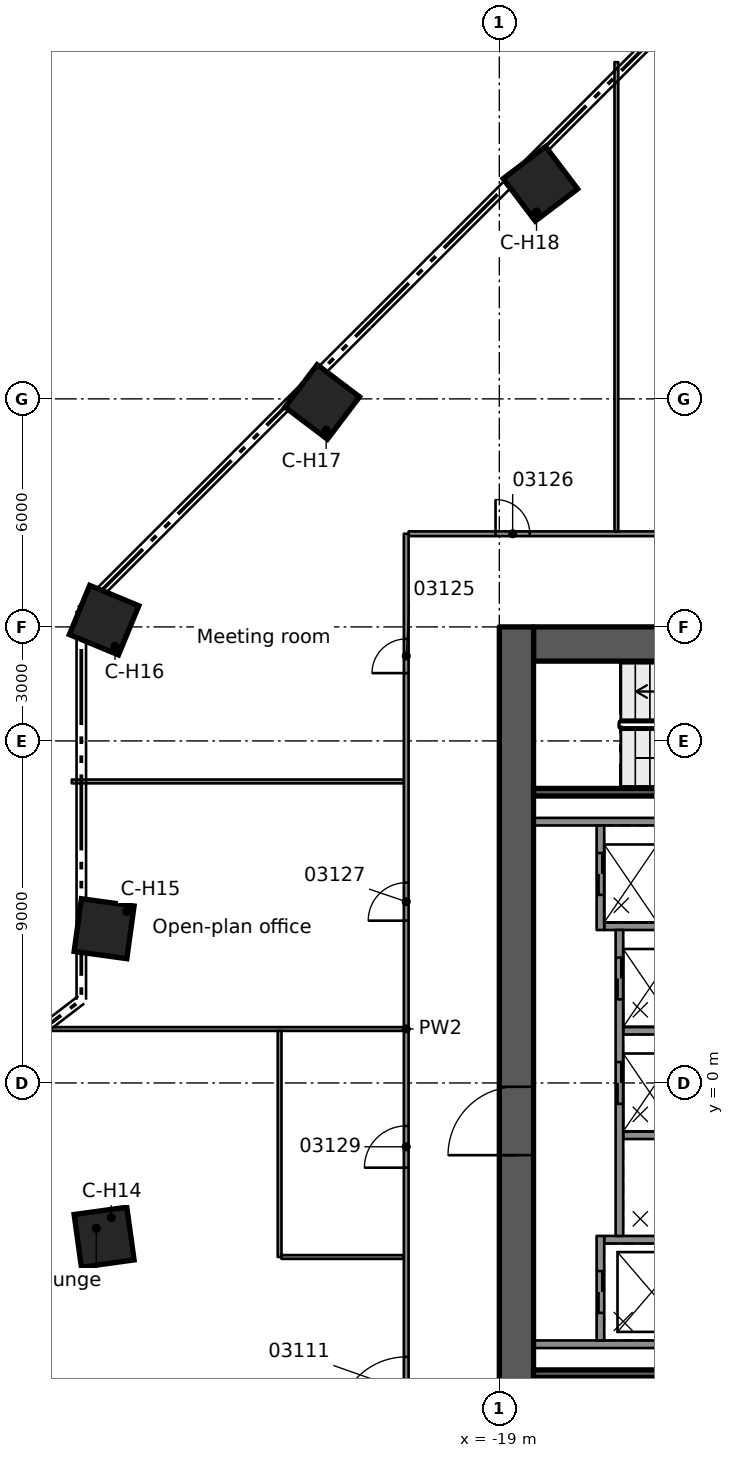
"""IFC4 building model, lengths in metres.
Left out: names, types, materials, properties, quantities, classifications, styles, units other than length and angle.
Written with IfcOpenShell. Run it as: python <this file> out.ifc"""

import sys

from ifc_helpers import new_model, si_unit, direction, frame, frame_2d, origin, origin_2d, place, context, subcontext, project, spatial, rectangle, extrude, element, fill, save


model = new_model("IFC4")
c1 = context("Model", 3, precision=1e-05, world=origin(), true_north=direction((0.0, 1.0)))
c2 = subcontext(c1, "Body", "Model", "MODEL_VIEW")
j1 = project(units=[si_unit("LENGTHUNIT", "METRE"), si_unit("PLANEANGLEUNIT", "RADIAN")], contexts=[c1])
p1 = place(None, origin())
s1 = spatial("IfcSite", under=j1, at=p1, CompositionType="ELEMENT")
p2 = place(p1, origin())
s2 = spatial("IfcBuilding", under=s1, at=p2, CompositionType="ELEMENT")
p3 = place(p2, frame((0.0, 0.0, 15.5)))
s3 = spatial("IfcBuildingStorey", under=s2, at=p3, CompositionType="ELEMENT", Elevation=15.5)
p4 = place(p3, frame((-18.1, 11.55, 0.0), z_axis=(0.0, 0.0, 1.0), x_axis=(1.0, 0.0, 0.0)))
e1 = element("IfcWall", 1, at=p4, inside=s3, PredefinedType="SHEAR", context=c2, shape_type="SweptSolid", body=[
    extrude(rectangle(XDim=9.2, YDim=0.9, at=frame_2d((4.6, 0.0))), origin(), (0.0, 0.0, 1.0), 5.0),
])
p5 = place(p4, frame((5.1, 0.0, 0.0)))
e2 = element("IfcOpeningElement", 2, at=p5, cuts=e1, PredefinedType="OPENING", context=c2, shape_type="SweptSolid", body=[
    extrude(rectangle(XDim=1.1, YDim=2.1, at=frame_2d((0.55, 1.05))), frame((0.0, 0.46, 0.0), z_axis=(0.0, -1.0, 0.0), x_axis=(1.0, 0.0, 0.0)), (0.0, 0.0, 1.0), 0.92),
])
p6 = place(p3, frame((-18.55, -12.0, 0.0), z_axis=(0.0, 0.0, 1.0), x_axis=(0.0, 1.0, 0.0)))
e3 = element("IfcWall", 3, at=p6, inside=s3, PredefinedType="SHEAR", context=c2, shape_type="SweptSolid", body=[
    extrude(rectangle(XDim=24.0, YDim=0.9, at=frame_2d((12.0, 0.0))), origin(), (0.0, 0.0, 1.0), 5.0),
])
p7 = place(p6, frame((10.1, 0.0, 0.0)))
e4 = element("IfcOpeningElement", 4, at=p7, cuts=e3, PredefinedType="OPENING", context=c2, shape_type="SweptSolid", body=[
    extrude(rectangle(XDim=1.8, YDim=2.1, at=frame_2d((0.9, 1.05))), frame((0.0, 0.46, 0.0), z_axis=(0.0, -1.0, 0.0), x_axis=(1.0, 0.0, 0.0)), (0.0, 0.0, 1.0), 0.92),
])
for number, where, z_axis, x_axis in (
    (5, (-29.4, -4.059, 0.0), (0.0, 0.0, 1.0), (-0.991, -0.137, 0.0)),
    (6, (-29.4, 4.059, 0.0), (0.0, 0.0, 1.0), (-0.991, 0.137, 0.0)),
    (7, (-29.4, 12.178, 0.0), (0.0, 0.0, 1.0), (-0.924, 0.383, 0.0)),
    (8, (-23.659, 17.919, 0.0), (0.0, 0.0, 1.0), (-0.797, 0.604, 0.0)),
    (9, (-17.919, 23.659, 0.0), (0.0, 0.0, 1.0), (-0.604, 0.797, 0.0)),
):
    element("IfcColumn", number, at=place(p3, frame(where, z_axis=z_axis, x_axis=x_axis)), inside=s3, PredefinedType="COLUMN", context=c2, shape_type="SweptSolid", body=[
        extrude(rectangle(XDim=1.4, YDim=1.4, at=origin_2d()), origin(), (0.0, 0.0, 1.0), 5.0),
    ])
for number, where, z_axis, x_axis in (
    (10, (-11.54, 6.875, 0.0), (0.0, 0.0, 1.0), (-1.0, 0.0, 0.0)),
    (11, (-11.54, -6.875, 0.0), (0.0, 0.0, 1.0), (-1.0, 0.0, 0.0)),
):
    element("IfcWall", number, at=place(p3, frame(where, z_axis=z_axis, x_axis=x_axis)), inside=s3, PredefinedType="SOLIDWALL", context=c2, shape_type="SweptSolid", body=[
        extrude(rectangle(XDim=6.56, YDim=0.2, at=frame_2d((3.28, 0.0))), origin(), (0.0, 0.0, 1.0), 4.59),
    ])
p8 = place(p3, frame((-11.54, -4.125, 0.0), z_axis=(0.0, 0.0, 1.0), x_axis=(-1.0, 0.0, 0.0)))
e12 = element("IfcWall", 12, at=p8, inside=s3, PredefinedType="SOLIDWALL", context=c2, shape_type="SweptSolid", body=[
    extrude(rectangle(XDim=4.7, YDim=0.2, at=frame_2d((2.35, 0.0))), origin(), (0.0, 0.0, 1.0), 4.59),
])
for number, where, z_axis, x_axis in (
    (13, (-11.54, -1.375, 0.0), (0.0, 0.0, 1.0), (-1.0, 0.0, 0.0)),
    (14, (-11.54, 1.375, 0.0), (0.0, 0.0, 1.0), (-1.0, 0.0, 0.0)),
):
    element("IfcWall", number, at=place(p3, frame(where, z_axis=z_axis, x_axis=x_axis)), inside=s3, PredefinedType="SOLIDWALL", context=c2, shape_type="SweptSolid", body=[
        extrude(rectangle(XDim=4.2, YDim=0.2, at=frame_2d((2.1, 0.0))), origin(), (0.0, 0.0, 1.0), 4.59),
    ])
p9 = place(p3, frame((-11.54, 4.125, 0.0), z_axis=(0.0, 0.0, 1.0), x_axis=(-1.0, 0.0, 0.0)))
e15 = element("IfcWall", 15, at=p9, inside=s3, PredefinedType="SOLIDWALL", context=c2, shape_type="SweptSolid", body=[
    extrude(rectangle(XDim=4.7, YDim=0.2, at=frame_2d((2.35, 0.0))), origin(), (0.0, 0.0, 1.0), 4.59),
])
p10 = place(p3, frame((-16.34, -6.775, 0.0), z_axis=(0.0, 0.0, 1.0), x_axis=(0.0, 1.0, 0.0)))
e16 = element("IfcWall", 16, at=p10, inside=s3, PredefinedType="SOLIDWALL", context=c2, shape_type="SweptSolid", body=[
    extrude(rectangle(XDim=2.75, YDim=0.2, at=frame_2d((1.375, 0.0))), origin(), (0.0, 0.0, 1.0), 4.59),
])
p11 = place(p10, frame((0.725, 0.0, 0.0)))
e17 = element("IfcOpeningElement", 17, at=p11, cuts=e16, PredefinedType="OPENING", context=c2, shape_type="SweptSolid", body=[
    extrude(rectangle(XDim=1.1, YDim=2.1, at=frame_2d((0.55, 1.05))), frame((0.0, 0.11, 0.0), z_axis=(0.0, -1.0, 0.0), x_axis=(1.0, 0.0, 0.0)), (0.0, 0.0, 1.0), 0.22),
])
p12 = place(p3, frame((-15.84, -4.025, 0.0), z_axis=(0.0, 0.0, 1.0), x_axis=(0.0, 1.0, 0.0)))
e18 = element("IfcWall", 18, at=p12, inside=s3, PredefinedType="SOLIDWALL", context=c2, shape_type="SweptSolid", body=[
    extrude(rectangle(XDim=8.05, YDim=0.2, at=frame_2d((4.025, 0.0))), origin(), (0.0, 0.0, 1.0), 4.59),
])
p13 = place(p12, frame((3.475, 0.0, 0.0)))
e19 = element("IfcOpeningElement", 19, at=p13, cuts=e18, PredefinedType="OPENING", context=c2, shape_type="SweptSolid", body=[
    extrude(rectangle(XDim=1.1, YDim=2.1, at=frame_2d((0.55, 1.05))), frame((0.0, 0.11, 0.0), z_axis=(0.0, -1.0, 0.0), x_axis=(1.0, 0.0, 0.0)), (0.0, 0.0, 1.0), 0.22),
])
p14 = place(p12, frame((6.225, 0.0, 0.0)))
e20 = element("IfcOpeningElement", 20, at=p14, cuts=e18, PredefinedType="OPENING", context=c2, shape_type="SweptSolid", body=[
    extrude(rectangle(XDim=1.1, YDim=2.1, at=frame_2d((0.55, 1.05))), frame((0.0, 0.11, 0.0), z_axis=(0.0, -1.0, 0.0), x_axis=(1.0, 0.0, 0.0)), (0.0, 0.0, 1.0), 0.22),
])
p15 = place(p3, frame((-16.34, 4.025, 0.0), z_axis=(0.0, 0.0, 1.0), x_axis=(0.0, 1.0, 0.0)))
e21 = element("IfcWall", 21, at=p15, inside=s3, PredefinedType="SOLIDWALL", context=c2, shape_type="SweptSolid", body=[
    extrude(rectangle(XDim=2.75, YDim=0.2, at=frame_2d((1.375, 0.0))), origin(), (0.0, 0.0, 1.0), 4.59),
])
p16 = place(p15, frame((0.925, 0.0, 0.0)))
e22 = element("IfcOpeningElement", 22, at=p16, cuts=e21, PredefinedType="OPENING", context=c2, shape_type="SweptSolid", body=[
    extrude(rectangle(XDim=1.1, YDim=2.1, at=frame_2d((0.55, 1.05))), frame((0.0, 0.11, 0.0), z_axis=(0.0, -1.0, 0.0), x_axis=(1.0, 0.0, 0.0)), (0.0, 0.0, 1.0), 0.22),
])
for number, where, z_axis, x_axis in (
    (23, (-11.54, 7.65, 0.0), (0.0, 0.0, 1.0), (-1.0, 0.0, 0.0)),
    (24, (-11.54, -7.65, 0.0), (0.0, 0.0, 1.0), (-1.0, 0.0, 0.0)),
):
    element("IfcWall", number, at=place(p3, frame(where, z_axis=z_axis, x_axis=x_axis)), inside=s3, PredefinedType="SOLIDWALL", context=c2, shape_type="SweptSolid", body=[
        extrude(rectangle(XDim=6.56, YDim=0.2, at=frame_2d((3.28, 0.0))), origin(), (0.0, 0.0, 1.0), 4.59),
    ])
p17 = place(p3, frame((-36.678, -2.62, 0.0), z_axis=(0.0, 0.0, 1.0), x_axis=(0.608783902678, -0.793336095132, 0.0)))
e25 = element("IfcWall", 25, at=p17, inside=s3, PredefinedType="PARTITIONING", context=c2, shape_type="SweptSolid", body=[
    extrude(rectangle(XDim=14.136, YDim=0.1, at=frame_2d((7.068, 0.0))), origin(), (0.0, 0.0, 1.0), 4.58),
])
p18 = place(p3, frame((-24.732, -4.579, 0.0), z_axis=(0.0, 0.0, 1.0), x_axis=(1.0, 0.0, 0.0)))
e26 = element("IfcWall", 26, at=p18, inside=s3, PredefinedType="PARTITIONING", context=c2, shape_type="SweptSolid", body=[
    extrude(rectangle(XDim=3.22, YDim=0.1, at=frame_2d((1.61, 0.0))), origin(), (0.0, 0.0, 1.0), 4.58),
])
p19 = place(p3, frame((-31.414, 1.42, 0.0), z_axis=(0.0, 0.0, 1.0), x_axis=(1.0, 0.0, 0.0)))
e27 = element("IfcWall", 27, at=p19, inside=s3, PredefinedType="PARTITIONING", context=c2, shape_type="SweptSolid", body=[
    extrude(rectangle(XDim=9.902, YDim=0.1, at=frame_2d((4.951, 0.0))), origin(), (0.0, 0.0, 1.0), 4.58),
])
p20 = place(p3, frame((-30.25, 7.934, 0.0), z_axis=(0.0, 0.0, 1.0), x_axis=(1.0, 0.0, 0.0)))
e28 = element("IfcWall", 28, at=p20, inside=s3, PredefinedType="PARTITIONING", context=c2, shape_type="SweptSolid", body=[
    extrude(rectangle(XDim=8.738, YDim=0.1, at=frame_2d((4.369, 0.0))), origin(), (0.0, 0.0, 1.0), 4.58),
])
p21 = place(p3, frame((-21.387, 14.451, 0.0), z_axis=(0.0, 0.0, 1.0), x_axis=(1.0, 0.0, 0.0)))
e29 = element("IfcWall", 29, at=p21, inside=s3, PredefinedType="PARTITIONING", context=c2, shape_type="SweptSolid", body=[
    extrude(rectangle(XDim=10.996, YDim=0.125, at=frame_2d((5.498, 0.0))), origin(), (0.0, 0.0, 1.0), 4.58),
])
p22 = place(p21, frame((2.288, 0.0, 0.0)))
e30 = element("IfcOpeningElement", 30, at=p22, cuts=e29, PredefinedType="OPENING", context=c2, shape_type="SweptSolid", body=[
    extrude(rectangle(XDim=0.9, YDim=2.1, at=frame_2d((0.45, 1.05))), frame((0.0, 0.073, 0.0), z_axis=(0.0, -1.0, 0.0), x_axis=(1.0, 0.0, 0.0)), (0.0, 0.0, 1.0), 0.145),
])
p23 = place(p3, frame((-15.92, 14.514, 0.0), z_axis=(0.0, 0.0, 1.0), x_axis=(0.0, 1.0, 0.0)))
e31 = element("IfcWall", 31, at=p23, inside=s3, PredefinedType="PARTITIONING", context=c2, shape_type="SweptSolid", body=[
    extrude(rectangle(XDim=12.346, YDim=0.1, at=frame_2d((6.173, 0.0))), origin(), (0.0, 0.0, 1.0), 4.58),
])
p24 = place(p3, frame((-21.45, -11.607, 0.0), z_axis=(0.0, 0.0, 1.0), x_axis=(0.0, 1.0, 0.0)))
e32 = element("IfcWall", 32, at=p24, inside=s3, PredefinedType="PARTITIONING", context=c2, shape_type="SweptSolid", body=[
    extrude(rectangle(XDim=26.058, YDim=0.125, at=frame_2d((13.029, 0.0))), origin(), (0.0, 0.0, 1.0), 4.58),
])
p25 = place(p24, frame((2.6, 0.0, 0.0)))
e33 = element("IfcOpeningElement", 33, at=p25, cuts=e32, PredefinedType="OPENING", context=c2, shape_type="SweptSolid", body=[
    extrude(rectangle(XDim=1.8, YDim=2.1, at=frame_2d((0.9, 1.05))), frame((0.0, 0.073, 0.0), z_axis=(0.0, -1.0, 0.0), x_axis=(1.0, 0.0, 0.0)), (0.0, 0.0, 1.0), 0.145),
])
p26 = place(p24, frame((22.391, 0.0, 0.0)))
e34 = element("IfcOpeningElement", 34, at=p26, cuts=e32, PredefinedType="OPENING", context=c2, shape_type="SweptSolid", body=[
    extrude(rectangle(XDim=0.9, YDim=2.1, at=frame_2d((0.45, 1.05))), frame((0.0, 0.073, 0.0), z_axis=(0.0, -1.0, 0.0), x_axis=(1.0, 0.0, 0.0)), (0.0, 0.0, 1.0), 0.145),
])
p27 = place(p24, frame((15.877, 0.0, 0.0)))
e35 = element("IfcOpeningElement", 35, at=p27, cuts=e32, PredefinedType="OPENING", context=c2, shape_type="SweptSolid", body=[
    extrude(rectangle(XDim=1.0, YDim=2.1, at=frame_2d((0.5, 1.05))), frame((0.0, 0.073, 0.0), z_axis=(0.0, -1.0, 0.0), x_axis=(1.0, 0.0, 0.0)), (0.0, 0.0, 1.0), 0.145),
])
p28 = place(p24, frame((9.378, 0.0, 0.0)))
e36 = element("IfcOpeningElement", 36, at=p28, cuts=e32, PredefinedType="OPENING", context=c2, shape_type="SweptSolid", body=[
    extrude(rectangle(XDim=1.1, YDim=2.1, at=frame_2d((0.55, 1.05))), frame((0.0, 0.073, 0.0), z_axis=(0.0, -1.0, 0.0), x_axis=(1.0, 0.0, 0.0)), (0.0, 0.0, 1.0), 0.145),
])
p29 = place(p3, frame((-24.782, -4.579, 0.0), z_axis=(0.0, 0.0, 1.0), x_axis=(0.0, 1.0, 0.0)))
e37 = element("IfcWall", 37, at=p29, inside=s3, PredefinedType="PARTITIONING", context=c2, shape_type="SweptSolid", body=[
    extrude(rectangle(XDim=5.949, YDim=0.1, at=frame_2d((2.975, 0.0))), origin(), (0.0, 0.0, 1.0), 4.58),
])
p30 = place(p11, origin())
e38 = element("IfcDoor", 38, at=p30, inside=s3, OperationType="DOUBLE_DOOR_SLIDING", PredefinedType="DOOR", context=c2, shape_type="SweptSolid", body=[
    extrude(rectangle(XDim=1.1, YDim=2.1, at=frame_2d((0.55, 1.05))), frame((0.0, 0.025, 0.0), z_axis=(0.0, -1.0, 0.0), x_axis=(1.0, 0.0, 0.0)), (0.0, 0.0, 1.0), 0.05),
])
fill(e17, e38)
p31 = place(p13, origin())
e39 = element("IfcDoor", 39, at=p31, inside=s3, OperationType="DOUBLE_DOOR_SLIDING", PredefinedType="DOOR", context=c2, shape_type="SweptSolid", body=[
    extrude(rectangle(XDim=1.1, YDim=2.1, at=frame_2d((0.55, 1.05))), frame((0.0, 0.025, 0.0), z_axis=(0.0, -1.0, 0.0), x_axis=(1.0, 0.0, 0.0)), (0.0, 0.0, 1.0), 0.05),
])
fill(e19, e39)
p32 = place(p14, origin())
e40 = element("IfcDoor", 40, at=p32, inside=s3, OperationType="DOUBLE_DOOR_SLIDING", PredefinedType="DOOR", context=c2, shape_type="SweptSolid", body=[
    extrude(rectangle(XDim=1.1, YDim=2.1, at=frame_2d((0.55, 1.05))), frame((0.0, 0.025, 0.0), z_axis=(0.0, -1.0, 0.0), x_axis=(1.0, 0.0, 0.0)), (0.0, 0.0, 1.0), 0.05),
])
fill(e20, e40)
p33 = place(p16, origin())
e41 = element("IfcDoor", 41, at=p33, inside=s3, OperationType="DOUBLE_DOOR_SLIDING", PredefinedType="DOOR", context=c2, shape_type="SweptSolid", body=[
    extrude(rectangle(XDim=1.1, YDim=2.1, at=frame_2d((0.55, 1.05))), frame((0.0, 0.025, 0.0), z_axis=(0.0, -1.0, 0.0), x_axis=(1.0, 0.0, 0.0)), (0.0, 0.0, 1.0), 0.05),
])
fill(e22, e41)
p34 = place(p7, origin())
e42 = element("IfcDoor", 42, at=p34, inside=s3, OperationType="SINGLE_SWING_LEFT", PredefinedType="DOOR", context=c2, shape_type="SweptSolid", body=[
    extrude(rectangle(XDim=1.8, YDim=2.1, at=frame_2d((0.9, 1.05))), frame((0.0, 0.025, 0.0), z_axis=(0.0, -1.0, 0.0), x_axis=(1.0, 0.0, 0.0)), (0.0, 0.0, 1.0), 0.05),
])
fill(e4, e42)
p35 = place(p25, origin())
e43 = element("IfcDoor", 43, at=p35, inside=s3, OperationType="DOUBLE_DOOR_SINGLE_SWING", PredefinedType="DOOR", context=c2, shape_type="SweptSolid", body=[
    extrude(rectangle(XDim=1.8, YDim=2.1, at=frame_2d((0.9, 1.05))), frame((0.0, 0.025, 0.0), z_axis=(0.0, -1.0, 0.0), x_axis=(1.0, 0.0, 0.0)), (0.0, 0.0, 1.0), 0.05),
])
fill(e33, e43)
p36 = place(p26, origin())
e44 = element("IfcDoor", 44, at=p36, inside=s3, OperationType="SINGLE_SWING_RIGHT", PredefinedType="DOOR", context=c2, shape_type="SweptSolid", body=[
    extrude(rectangle(XDim=0.9, YDim=2.1, at=frame_2d((0.45, 1.05))), frame((0.0, 0.025, 0.0), z_axis=(0.0, -1.0, 0.0), x_axis=(1.0, 0.0, 0.0)), (0.0, 0.0, 1.0), 0.05),
])
fill(e34, e44)
p37 = place(p22, origin())
e45 = element("IfcDoor", 45, at=p37, inside=s3, OperationType="SINGLE_SWING_LEFT", PredefinedType="DOOR", context=c2, shape_type="SweptSolid", body=[
    extrude(rectangle(XDim=0.9, YDim=2.1, at=frame_2d((0.45, 1.05))), frame((0.0, 0.025, 0.0), z_axis=(0.0, -1.0, 0.0), x_axis=(1.0, 0.0, 0.0)), (0.0, 0.0, 1.0), 0.05),
])
fill(e30, e45)
p38 = place(p27, origin())
e46 = element("IfcDoor", 46, at=p38, inside=s3, OperationType="SINGLE_SWING_RIGHT", PredefinedType="DOOR", context=c2, shape_type="SweptSolid", body=[
    extrude(rectangle(XDim=1.0, YDim=2.1, at=frame_2d((0.5, 1.05))), frame((0.0, 0.025, 0.0), z_axis=(0.0, -1.0, 0.0), x_axis=(1.0, 0.0, 0.0)), (0.0, 0.0, 1.0), 0.05),
])
fill(e35, e46)
p39 = place(p28, origin())
e47 = element("IfcDoor", 47, at=p39, inside=s3, OperationType="SINGLE_SWING_LEFT", PredefinedType="DOOR", context=c2, shape_type="SweptSolid", body=[
    extrude(rectangle(XDim=1.1, YDim=2.1, at=frame_2d((0.55, 1.05))), frame((0.0, 0.025, 0.0), z_axis=(0.0, -1.0, 0.0), x_axis=(1.0, 0.0, 0.0)), (0.0, 0.0, 1.0), 0.05),
])
fill(e36, e47)
save(model, sys.argv[1])
